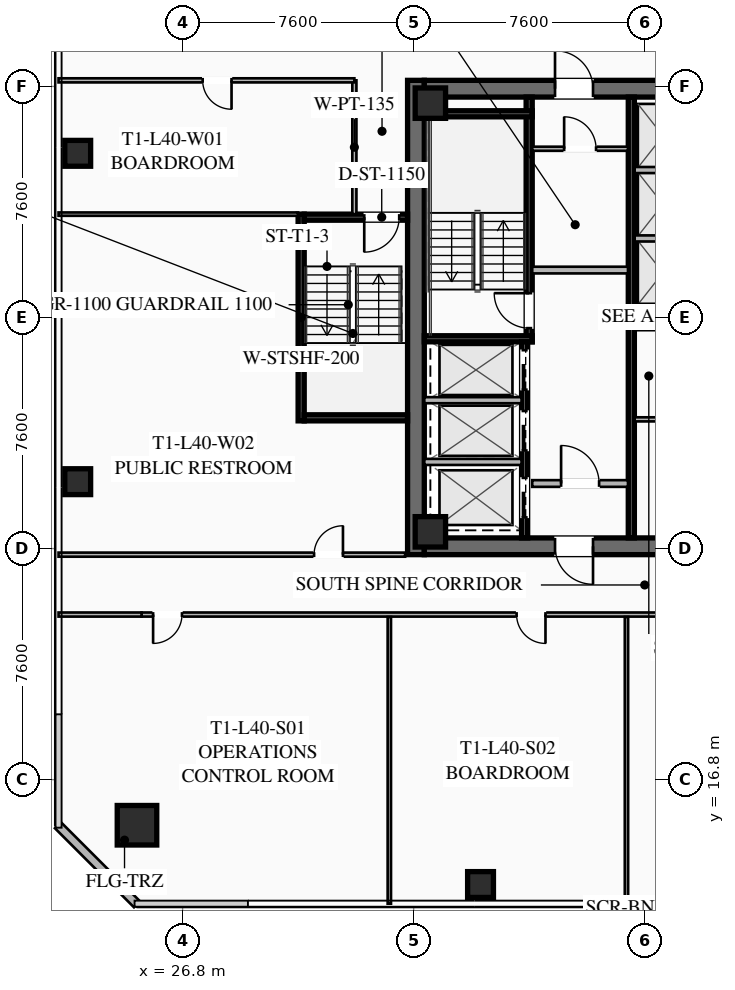
"""IFC4 building model, lengths in metres.
Left out: names, types, materials, properties, quantities, classifications, styles, units other than length and angle.
Written with IfcOpenShell. Run it as: python <this file> out.ifc"""

import sys

from ifc_helpers import new_model, si_unit, direction, frame, frame_2d, origin, origin_2d, place, context, subcontext, project, spatial, rectangle, hollow_rectangle, extrude, element, fill, save


model = new_model("IFC4")
c1 = context("Model", 3, precision=1e-05, world=origin(), true_north=direction((0.0, 1.0)))
c2 = subcontext(c1, "Body", "Model", "MODEL_VIEW")
j1 = project(units=[si_unit("LENGTHUNIT", "METRE"), si_unit("PLANEANGLEUNIT", "RADIAN")], contexts=[c1])
p1 = place(None, origin())
s1 = spatial("IfcSite", under=j1, at=p1, CompositionType="ELEMENT")
p2 = place(p1, origin())
s2 = spatial("IfcBuilding", under=s1, at=p2, CompositionType="ELEMENT")
p3 = place(p2, frame((0.0, 0.0, 149.9)))
s3 = spatial("IfcBuildingStorey", under=s2, at=p3, CompositionType="ELEMENT", Elevation=149.9)
p4 = place(p3, frame((34.475, 24.2, 0.0), z_axis=(0.0, 0.0, 1.0), x_axis=(0.0, 1.0, 0.0)))
e1 = element("IfcWall", 1, at=p4, inside=s3, PredefinedType="SHEAR", context=c2, shape_type="SweptSolid", body=[
    extrude(rectangle(XDim=15.6, YDim=0.55, at=frame_2d((7.8, 0.0))), origin(), (0.0, 0.0, 1.0), 3.55),
])
p5 = place(p3, frame((49.25, 24.475, 0.0), z_axis=(0.0, 0.0, 1.0), x_axis=(-1.0, 0.0, 0.0)))
e2 = element("IfcWall", 2, at=p5, inside=s3, PredefinedType="SHEAR", context=c2, shape_type="SweptSolid", body=[
    extrude(rectangle(XDim=14.5, YDim=0.55, at=frame_2d((7.25, 0.0))), origin(), (0.0, 0.0, 1.0), 3.55),
])
p6 = place(p5, frame((8.95, 0.0, 0.0)))
e3 = element("IfcOpeningElement", 3, at=p6, cuts=e2, PredefinedType="OPENING", context=c2, shape_type="SweptSolid", body=[
    extrude(rectangle(XDim=1.25, YDim=2.25, at=frame_2d((0.625, 1.125))), frame((0.0, 0.285, 0.0), z_axis=(0.0, -1.0, 0.0), x_axis=(1.0, 0.0, 0.0)), (0.0, 0.0, 1.0), 0.57),
])
p7 = place(p5, frame((3.9, 0.0, 0.0)))
e4 = element("IfcOpeningElement", 4, at=p7, cuts=e2, PredefinedType="OPENING", context=c2, shape_type="SweptSolid", body=[
    extrude(rectangle(XDim=1.25, YDim=2.25, at=frame_2d((0.625, 1.125))), frame((0.0, 0.285, 0.0), z_axis=(0.0, -1.0, 0.0), x_axis=(1.0, 0.0, 0.0)), (0.0, 0.0, 1.0), 0.57),
])
p8 = place(p3, frame((34.75, 39.525, 0.0), z_axis=(0.0, 0.0, 1.0), x_axis=(1.0, 0.0, 0.0)))
e5 = element("IfcWall", 5, at=p8, inside=s3, PredefinedType="SHEAR", context=c2, shape_type="SweptSolid", body=[
    extrude(rectangle(XDim=14.5, YDim=0.55, at=frame_2d((7.25, 0.0))), origin(), (0.0, 0.0, 1.0), 3.55),
])
p9 = place(p8, frame((4.3, 0.0, 0.0)))
e6 = element("IfcOpeningElement", 6, at=p9, cuts=e5, PredefinedType="OPENING", context=c2, shape_type="SweptSolid", body=[
    extrude(rectangle(XDim=1.25, YDim=2.25, at=frame_2d((0.625, 1.125))), frame((0.0, 0.285, 0.0), z_axis=(0.0, -1.0, 0.0), x_axis=(1.0, 0.0, 0.0)), (0.0, 0.0, 1.0), 0.57),
])
p10 = place(p8, frame((9.35, 0.0, 0.0)))
e7 = element("IfcOpeningElement", 7, at=p10, cuts=e5, PredefinedType="OPENING", context=c2, shape_type="SweptSolid", body=[
    extrude(rectangle(XDim=1.25, YDim=2.25, at=frame_2d((0.625, 1.125))), frame((0.0, 0.285, 0.0), z_axis=(0.0, -1.0, 0.0), x_axis=(1.0, 0.0, 0.0)), (0.0, 0.0, 1.0), 0.57),
])
for number, where, z_axis, x_axis in (
    (8, (34.95, 24.95, 0.0), (0.0, 0.0, 1.0), (1.0, 0.0, 0.0)),
    (9, (34.95, 39.05, 0.0), (0.0, 0.0, 1.0), (1.0, 0.0, 0.0)),
):
    element("IfcColumn", number, at=place(p3, frame(where, z_axis=z_axis, x_axis=x_axis)), inside=s3, PredefinedType="COLUMN", context=c2, shape_type="SweptSolid", body=[
        extrude(hollow_rectangle(XDim=1.0, YDim=1.0, WallThickness=0.04, at=origin_2d()), origin(), (0.0, 0.0, 1.0), 3.37),
    ])
p11 = place(p3, frame((25.3, 15.3, 0.0), z_axis=(0.0, 0.0, 1.0), x_axis=(1.0, 0.0, 0.0)))
e10 = element("IfcColumn", 10, at=p11, inside=s3, PredefinedType="COLUMN", context=c2, shape_type="SweptSolid", body=[
    extrude(hollow_rectangle(XDim=1.3, YDim=1.3, WallThickness=0.05, at=origin_2d()), origin(), (0.0, 0.0, 1.0), 3.37),
])
for number, where, z_axis, x_axis in (
    (11, (36.6, 13.35, 0.0), (0.0, 0.0, 1.0), (1.0, 0.0, 0.0)),
    (12, (23.35, 37.4, 0.0), (0.0, 0.0, 1.0), (1.0, 0.0, 0.0)),
    (13, (23.35, 26.6, 0.0), (0.0, 0.0, 1.0), (1.0, 0.0, 0.0)),
):
    element("IfcColumn", number, at=place(p3, frame(where, z_axis=z_axis, x_axis=x_axis)), inside=s3, PredefinedType="COLUMN", context=c2, shape_type="SweptSolid", body=[
        extrude(hollow_rectangle(XDim=0.85, YDim=0.85, WallThickness=0.035, at=origin_2d()), origin(), (0.0, 0.0, 1.0), 3.37),
    ])
p12 = place(p3, frame((25.3, 12.7, 0.0), z_axis=(0.0, 0.0, 1.0), x_axis=(-0.707106781187, 0.707106781187, 0.0)))
e14 = element("IfcWall", 14, at=p12, inside=s3, PredefinedType="SOLIDWALL", context=c2, shape_type="SweptSolid", body=[
    extrude(rectangle(XDim=3.677, YDim=0.28, at=frame_2d((1.838, 0.0))), origin(), (0.0, 0.0, 1.0), 3.37),
])
p13 = place(p3, frame((38.2, 31.2, 0.0), z_axis=(0.0, 0.0, 1.0), x_axis=(0.0, 1.0, 0.0)))
e15 = element("IfcWall", 15, at=p13, inside=s3, PredefinedType="SHEAR", context=c2, shape_type="SweptSolid", body=[
    extrude(rectangle(XDim=8.05, YDim=0.2, at=frame_2d((4.025, 0.0))), origin(), (0.0, 0.0, 1.0), 3.37),
])
p14 = place(p13, frame((0.45, 0.0, 0.0)))
e16 = element("IfcOpeningElement", 16, at=p14, cuts=e15, PredefinedType="OPENING", context=c2, shape_type="SweptSolid", body=[
    extrude(rectangle(XDim=1.15, YDim=2.2, at=frame_2d((0.575, 1.1))), frame((0.0, 0.11, 0.0), z_axis=(0.0, -1.0, 0.0), x_axis=(1.0, 0.0, 0.0)), (0.0, 0.0, 1.0), 0.22),
])
for number, where, z_axis, x_axis in (
    (17, (34.75, 31.3, 0.0), (0.0, 0.0, 1.0), (1.0, 0.0, 0.0)),
    (18, (34.75, 38.7, 0.0), (0.0, 0.0, 1.0), (1.0, 0.0, 0.0)),
):
    element("IfcWall", number, at=place(p3, frame(where, z_axis=z_axis, x_axis=x_axis)), inside=s3, PredefinedType="SHEAR", context=c2, shape_type="SweptSolid", body=[
        extrude(rectangle(XDim=3.55, YDim=0.2, at=frame_2d((1.775, 0.0))), origin(), (0.0, 0.0, 1.0), 3.37),
    ])
p15 = place(p3, frame((41.56, 24.75, 0.0), z_axis=(0.0, 0.0, 1.0), x_axis=(0.0, 1.0, 0.0)))
e19 = element("IfcWall", 19, at=p15, inside=s3, PredefinedType="SHEAR", context=c2, shape_type="SweptSolid", body=[
    extrude(rectangle(XDim=14.5, YDim=0.2, at=frame_2d((7.25, 0.0))), origin(), (0.0, 0.0, 1.0), 3.37),
])
p16 = place(p3, frame((38.3, 33.56, 0.0), z_axis=(0.0, 0.0, 1.0), x_axis=(1.0, 0.0, 0.0)))
e20 = element("IfcWall", 20, at=p16, inside=s3, PredefinedType="SOLIDWALL", context=c2, shape_type="SweptSolid", body=[
    extrude(rectangle(XDim=3.15, YDim=0.22, at=frame_2d((1.575, 0.0))), origin(), (0.0, 0.0, 1.0), 2.723),
])
p17 = place(p3, frame((38.3, 26.54, 0.0), z_axis=(0.0, 0.0, 1.0), x_axis=(1.0, 0.0, 0.0)))
e21 = element("IfcWall", 21, at=p17, inside=s3, PredefinedType="SOLIDWALL", context=c2, shape_type="SweptSolid", body=[
    extrude(rectangle(XDim=3.15, YDim=0.22, at=frame_2d((1.575, 0.0))), origin(), (0.0, 0.0, 1.0), 2.723),
])
p18 = place(p17, frame((0.95, 0.0, 0.0)))
e22 = element("IfcOpeningElement", 22, at=p18, cuts=e21, PredefinedType="OPENING", context=c2, shape_type="SweptSolid", body=[
    extrude(rectangle(XDim=1.25, YDim=2.25, at=frame_2d((0.625, 1.125))), frame((0.0, 0.12, 0.0), z_axis=(0.0, -1.0, 0.0), x_axis=(1.0, 0.0, 0.0)), (0.0, 0.0, 1.0), 0.24),
])
p19 = place(p3, frame((38.05, 24.75, 0.0), z_axis=(0.0, 0.0, 1.0), x_axis=(0.0, 1.0, 0.0)))
e23 = element("IfcWall", 23, at=p19, inside=s3, PredefinedType="SHEAR", context=c2, shape_type="SweptSolid", body=[
    extrude(rectangle(XDim=6.45, YDim=0.2, at=frame_2d((3.225, 0.0))), origin(), (0.0, 0.0, 1.0), 3.37),
])
p20 = place(p19, frame((4.875, 0.0, 0.0)))
e24 = element("IfcOpeningElement", 24, at=p20, cuts=e23, PredefinedType="OPENING", context=c2, shape_type="SweptSolid", body=[
    extrude(rectangle(XDim=1.3, YDim=2.25, at=frame_2d((0.65, 1.125))), frame((0.0, 0.11, 0.0), z_axis=(0.0, -1.0, 0.0), x_axis=(1.0, 0.0, 0.0)), (0.0, 0.0, 1.0), 0.22),
])
p21 = place(p19, frame((2.875, 0.0, 0.0)))
e25 = element("IfcOpeningElement", 25, at=p21, cuts=e23, PredefinedType="OPENING", context=c2, shape_type="SweptSolid", body=[
    extrude(rectangle(XDim=1.3, YDim=2.25, at=frame_2d((0.65, 1.125))), frame((0.0, 0.11, 0.0), z_axis=(0.0, -1.0, 0.0), x_axis=(1.0, 0.0, 0.0)), (0.0, 0.0, 1.0), 0.22),
])
p22 = place(p19, frame((0.675, 0.0, 0.0)))
e26 = element("IfcOpeningElement", 26, at=p22, cuts=e23, PredefinedType="OPENING", context=c2, shape_type="SweptSolid", body=[
    extrude(rectangle(XDim=1.3, YDim=2.25, at=frame_2d((0.65, 1.125))), frame((0.0, 0.11, 0.0), z_axis=(0.0, -1.0, 0.0), x_axis=(1.0, 0.0, 0.0)), (0.0, 0.0, 1.0), 0.22),
])
for number, where, z_axis, x_axis in (
    (27, (34.75, 27.25, 0.0), (0.0, 0.0, 1.0), (1.0, 0.0, 0.0)),
    (28, (34.75, 29.28, 0.0), (0.0, 0.0, 1.0), (1.0, 0.0, 0.0)),
):
    element("IfcWall", number, at=place(p3, frame(where, z_axis=z_axis, x_axis=x_axis)), inside=s3, PredefinedType="SOLIDWALL", context=c2, shape_type="SweptSolid", body=[
        extrude(rectangle(XDim=3.2, YDim=0.2, at=frame_2d((1.6, 0.0))), origin(), (0.0, 0.0, 1.0), 3.37),
    ])
p23 = place(p3, frame((38.3, 37.55, 0.0), z_axis=(0.0, 0.0, 1.0), x_axis=(1.0, 0.0, 0.0)))
e29 = element("IfcWall", 29, at=p23, inside=s3, PredefinedType="PARTITIONING", context=c2, shape_type="SweptSolid", body=[
    extrude(rectangle(XDim=3.15, YDim=0.135, at=frame_2d((1.575, 0.0))), origin(), (0.0, 0.0, 1.0), 2.723),
])
p24 = place(p23, frame((1.05, 0.0, 0.0)))
e30 = element("IfcOpeningElement", 30, at=p24, cuts=e29, PredefinedType="OPENING", context=c2, shape_type="SweptSolid", body=[
    extrude(rectangle(XDim=1.05, YDim=2.2, at=frame_2d((0.525, 1.1))), frame((0.0, 0.077, 0.0), z_axis=(0.0, -1.0, 0.0), x_axis=(1.0, 0.0, 0.0)), (0.0, 0.0, 1.0), 0.155),
])
for number, where, z_axis, x_axis in (
    (31, (41.67, 31.65, 0.0), (0.0, 0.0, 1.0), (1.0, 0.0, 0.0)),
    (32, (41.67, 28.65, 0.0), (0.0, 0.0, 1.0), (1.0, 0.0, 0.0)),
):
    element("IfcWall", number, at=place(p3, frame(where, z_axis=z_axis, x_axis=x_axis)), inside=s3, PredefinedType="PARTITIONING", context=c2, shape_type="SweptSolid", body=[
        extrude(rectangle(XDim=1.88, YDim=0.135, at=frame_2d((0.94, 0.0))), origin(), (0.0, 0.0, 1.0), 2.723),
    ])
for number, where, z_axis, x_axis in (
    (33, (41.67, 32.35, 0.0), (0.0, 0.0, 1.0), (1.0, 0.0, 0.0)),
    (34, (41.67, 34.6, 0.0), (0.0, 0.0, 1.0), (1.0, 0.0, 0.0)),
    (35, (41.67, 36.85, 0.0), (0.0, 0.0, 1.0), (1.0, 0.0, 0.0)),
):
    element("IfcWall", number, at=place(p3, frame(where, z_axis=z_axis, x_axis=x_axis)), inside=s3, PredefinedType="SOLIDWALL", context=c2, shape_type="SweptSolid", body=[
        extrude(rectangle(XDim=1.88, YDim=0.2, at=frame_2d((0.94, 0.0))), origin(), (0.0, 0.0, 1.0), 3.37),
    ])
p25 = place(p3, frame((30.7, 28.6, 0.0), z_axis=(0.0, 0.0, 1.0), x_axis=(0.0, 1.0, 0.0)))
e36 = element("IfcWall", 36, at=p25, inside=s3, PredefinedType="SHEAR", context=c2, shape_type="SweptSolid", body=[
    extrude(rectangle(XDim=6.8, YDim=0.2, at=frame_2d((3.4, 0.0))), origin(), (0.0, 0.0, 1.0), 3.37),
])
p26 = place(p3, frame((34.2, 35.3, 0.0), z_axis=(0.0, 0.0, 1.0), x_axis=(-1.0, 0.0, 0.0)))
e37 = element("IfcWall", 37, at=p26, inside=s3, PredefinedType="SHEAR", context=c2, shape_type="SweptSolid", body=[
    extrude(rectangle(XDim=3.4, YDim=0.2, at=frame_2d((1.7, 0.0))), origin(), (0.0, 0.0, 1.0), 3.37),
])
p27 = place(p26, frame((0.275, 0.0, 0.0)))
e38 = element("IfcOpeningElement", 38, at=p27, cuts=e37, PredefinedType="OPENING", context=c2, shape_type="SweptSolid", body=[
    extrude(rectangle(XDim=1.15, YDim=2.2, at=frame_2d((0.575, 1.1))), frame((0.0, 0.11, 0.0), z_axis=(0.0, -1.0, 0.0), x_axis=(1.0, 0.0, 0.0)), (0.0, 0.0, 1.0), 0.22),
])
p28 = place(p3, frame((30.8, 28.7, 0.0), z_axis=(0.0, 0.0, 1.0), x_axis=(1.0, 0.0, 0.0)))
e39 = element("IfcWall", 39, at=p28, inside=s3, PredefinedType="SHEAR", context=c2, shape_type="SweptSolid", body=[
    extrude(rectangle(XDim=3.4, YDim=0.2, at=frame_2d((1.7, 0.0))), origin(), (0.0, 0.0, 1.0), 3.37),
])
p29 = place(p3, frame((32.45, 35.4, 0.0), z_axis=(0.0, 0.0, 1.0), x_axis=(0.0, 1.0, 0.0)))
e40 = element("IfcWall", 40, at=p29, inside=s3, PredefinedType="PARTITIONING", context=c2, shape_type="SweptSolid", body=[
    extrude(rectangle(XDim=4.4, YDim=0.135, at=frame_2d((2.2, 0.0))), origin(), (0.0, 0.0, 1.0), 2.723),
])
p30 = place(p3, frame((58.55, 22.23, 0.0), z_axis=(0.0, 0.0, 1.0), x_axis=(-1.0, 0.0, 0.0)))
e41 = element("IfcWall", 41, at=p30, inside=s3, PredefinedType="PARTITIONING", context=c2, shape_type="SweptSolid", body=[
    extrude(rectangle(XDim=33.1, YDim=0.135, at=frame_2d((16.55, 0.0))), origin(), (0.0, 0.0, 1.0), 2.723),
])
p31 = place(p30, frame((31.77, 0.0, 0.0)))
e42 = element("IfcOpeningElement", 42, at=p31, cuts=e41, PredefinedType="OPENING", context=c2, shape_type="SweptSolid", body=[
    extrude(rectangle(XDim=0.95, YDim=2.05, at=frame_2d((0.475, 1.025))), frame((0.0, 0.077, 0.0), z_axis=(0.0, -1.0, 0.0), x_axis=(1.0, 0.0, 0.0)), (0.0, 0.0, 1.0), 0.155),
])
p32 = place(p30, frame((19.814, 0.0, 0.0)))
e43 = element("IfcOpeningElement", 43, at=p32, cuts=e41, PredefinedType="OPENING", context=c2, shape_type="SweptSolid", body=[
    extrude(rectangle(XDim=0.95, YDim=2.05, at=frame_2d((0.475, 1.025))), frame((0.0, 0.077, 0.0), z_axis=(0.0, -1.0, 0.0), x_axis=(1.0, 0.0, 0.0)), (0.0, 0.0, 1.0), 0.155),
])
p33 = place(p30, frame((0.38, 0.0, 0.0)))
e44 = element("IfcOpeningElement", 44, at=p33, cuts=e41, PredefinedType="OPENING", context=c2, shape_type="SweptSolid", body=[
    extrude(rectangle(XDim=0.95, YDim=2.05, at=frame_2d((0.475, 1.025))), frame((0.0, 0.077, 0.0), z_axis=(0.0, -1.0, 0.0), x_axis=(1.0, 0.0, 0.0)), (0.0, 0.0, 1.0), 0.155),
])
p34 = place(p3, frame((22.72, 22.23, 0.0), z_axis=(0.0, 0.0, 1.0), x_axis=(1.0, 0.0, 0.0)))
e45 = element("IfcWall", 45, at=p34, inside=s3, PredefinedType="PARTITIONING", context=c2, shape_type="SweptSolid", body=[
    extrude(rectangle(XDim=2.73, YDim=0.135, at=frame_2d((1.365, 0.0))), origin(), (0.0, 0.0, 1.0), 2.723),
])
for number, where, z_axis, x_axis in (
    (46, (33.6, 12.72, 0.0), (0.0, 0.0, 1.0), (0.0, 1.0, 0.0)),
    (47, (41.4, 12.72, 0.0), (0.0, 0.0, 1.0), (0.0, 1.0, 0.0)),
):
    element("IfcWall", number, at=place(p3, frame(where, z_axis=z_axis, x_axis=x_axis)), inside=s3, PredefinedType="PARTITIONING", context=c2, shape_type="SweptSolid", body=[
        extrude(rectangle(XDim=9.43, YDim=0.11, at=frame_2d((4.715, 0.0))), origin(), (0.0, 0.0, 1.0), 2.723),
    ])
p35 = place(p3, frame((32.45, 39.8, 0.0), z_axis=(0.0, 0.0, 1.0), x_axis=(-1.0, 0.0, 0.0)))
e48 = element("IfcWall", 48, at=p35, inside=s3, PredefinedType="PARTITIONING", context=c2, shape_type="SweptSolid", body=[
    extrude(rectangle(XDim=9.73, YDim=0.135, at=frame_2d((4.865, 0.0))), origin(), (0.0, 0.0, 1.0), 2.723),
])
p36 = place(p35, frame((4.04, 0.0, 0.0)))
e49 = element("IfcOpeningElement", 49, at=p36, cuts=e48, PredefinedType="OPENING", context=c2, shape_type="SweptSolid", body=[
    extrude(rectangle(XDim=0.95, YDim=2.05, at=frame_2d((0.475, 1.025))), frame((0.0, 0.077, 0.0), z_axis=(0.0, -1.0, 0.0), x_axis=(1.0, 0.0, 0.0)), (0.0, 0.0, 1.0), 0.155),
])
p37 = place(p3, frame((22.72, 24.2, 0.0), z_axis=(0.0, 0.0, 1.0), x_axis=(1.0, 0.0, 0.0)))
e50 = element("IfcWall", 50, at=p37, inside=s3, PredefinedType="PARTITIONING", context=c2, shape_type="SweptSolid", body=[
    extrude(rectangle(XDim=11.4, YDim=0.135, at=frame_2d((5.7, 0.0))), origin(), (0.0, 0.0, 1.0), 2.723),
])
p38 = place(p37, frame((8.405, 0.0, 0.0)))
e51 = element("IfcOpeningElement", 51, at=p38, cuts=e50, PredefinedType="OPENING", context=c2, shape_type="SweptSolid", body=[
    extrude(rectangle(XDim=0.95, YDim=2.05, at=frame_2d((0.475, 1.025))), frame((0.0, 0.077, 0.0), z_axis=(0.0, -1.0, 0.0), x_axis=(1.0, 0.0, 0.0)), (0.0, 0.0, 1.0), 0.155),
])
p39 = place(p3, frame((30.6, 35.4, 0.0), z_axis=(0.0, 0.0, 1.0), x_axis=(-1.0, 0.0, 0.0)))
e52 = element("IfcWall", 52, at=p39, inside=s3, PredefinedType="PARTITIONING", context=c2, shape_type="SweptSolid", body=[
    extrude(rectangle(XDim=7.88, YDim=0.11, at=frame_2d((3.94, 0.0))), origin(), (0.0, 0.0, 1.0), 2.723),
])
p40 = place(p9, origin())
e53 = element("IfcDoor", 53, at=p40, inside=s3, OperationType="SINGLE_SWING_LEFT", PredefinedType="DOOR", context=c2, shape_type="SweptSolid", body=[
    extrude(rectangle(XDim=1.25, YDim=2.25, at=frame_2d((0.625, 1.125))), frame((0.0, 0.025, 0.0), z_axis=(0.0, -1.0, 0.0), x_axis=(1.0, 0.0, 0.0)), (0.0, 0.0, 1.0), 0.05),
])
fill(e6, e53)
p41 = place(p6, origin())
e54 = element("IfcDoor", 54, at=p41, inside=s3, OperationType="SINGLE_SWING_LEFT", PredefinedType="DOOR", context=c2, shape_type="SweptSolid", body=[
    extrude(rectangle(XDim=1.25, YDim=2.25, at=frame_2d((0.625, 1.125))), frame((0.0, 0.025, 0.0), z_axis=(0.0, -1.0, 0.0), x_axis=(1.0, 0.0, 0.0)), (0.0, 0.0, 1.0), 0.05),
])
fill(e3, e54)
p42 = place(p14, origin())
e55 = element("IfcDoor", 55, at=p42, inside=s3, OperationType="SINGLE_SWING_RIGHT", PredefinedType="DOOR", context=c2, shape_type="SweptSolid", body=[
    extrude(rectangle(XDim=1.15, YDim=2.2, at=frame_2d((0.575, 1.1))), frame((0.0, 0.025, 0.0), z_axis=(0.0, -1.0, 0.0), x_axis=(1.0, 0.0, 0.0)), (0.0, 0.0, 1.0), 0.05),
])
fill(e16, e55)
p43 = place(p18, origin())
e56 = element("IfcDoor", 56, at=p43, inside=s3, OperationType="SINGLE_SWING_LEFT", PredefinedType="DOOR", context=c2, shape_type="SweptSolid", body=[
    extrude(rectangle(XDim=1.25, YDim=2.25, at=frame_2d((0.625, 1.125))), frame((0.0, 0.025, 0.0), z_axis=(0.0, -1.0, 0.0), x_axis=(1.0, 0.0, 0.0)), (0.0, 0.0, 1.0), 0.05),
])
fill(e22, e56)
p44 = place(p24, origin())
e57 = element("IfcDoor", 57, at=p44, inside=s3, OperationType="SINGLE_SWING_LEFT", PredefinedType="DOOR", context=c2, shape_type="SweptSolid", body=[
    extrude(rectangle(XDim=1.05, YDim=2.2, at=frame_2d((0.525, 1.1))), frame((0.0, 0.025, 0.0), z_axis=(0.0, -1.0, 0.0), x_axis=(1.0, 0.0, 0.0)), (0.0, 0.0, 1.0), 0.05),
])
fill(e30, e57)
p45 = place(p27, origin())
e58 = element("IfcDoor", 58, at=p45, inside=s3, OperationType="SINGLE_SWING_RIGHT", PredefinedType="DOOR", context=c2, shape_type="SweptSolid", body=[
    extrude(rectangle(XDim=1.15, YDim=2.2, at=frame_2d((0.575, 1.1))), frame((0.0, 0.025, 0.0), z_axis=(0.0, -1.0, 0.0), x_axis=(1.0, 0.0, 0.0)), (0.0, 0.0, 1.0), 0.05),
])
fill(e38, e58)
p46 = place(p31, origin())
e59 = element("IfcDoor", 59, at=p46, inside=s3, OperationType="SINGLE_SWING_RIGHT", PredefinedType="DOOR", context=c2, shape_type="SweptSolid", body=[
    extrude(rectangle(XDim=0.95, YDim=2.05, at=frame_2d((0.475, 1.025))), frame((0.0, 0.025, 0.0), z_axis=(0.0, -1.0, 0.0), x_axis=(1.0, 0.0, 0.0)), (0.0, 0.0, 1.0), 0.05),
])
fill(e42, e59)
p47 = place(p32, origin())
e60 = element("IfcDoor", 60, at=p47, inside=s3, OperationType="SINGLE_SWING_LEFT", PredefinedType="DOOR", context=c2, shape_type="SweptSolid", body=[
    extrude(rectangle(XDim=0.95, YDim=2.05, at=frame_2d((0.475, 1.025))), frame((0.0, 0.025, 0.0), z_axis=(0.0, -1.0, 0.0), x_axis=(1.0, 0.0, 0.0)), (0.0, 0.0, 1.0), 0.05),
])
fill(e43, e60)
p48 = place(p36, origin())
e61 = element("IfcDoor", 61, at=p48, inside=s3, OperationType="SINGLE_SWING_LEFT", PredefinedType="DOOR", context=c2, shape_type="SweptSolid", body=[
    extrude(rectangle(XDim=0.95, YDim=2.05, at=frame_2d((0.475, 1.025))), frame((0.0, 0.025, 0.0), z_axis=(0.0, -1.0, 0.0), x_axis=(1.0, 0.0, 0.0)), (0.0, 0.0, 1.0), 0.05),
])
fill(e49, e61)
p49 = place(p38, origin())
e62 = element("IfcDoor", 62, at=p49, inside=s3, OperationType="SINGLE_SWING_RIGHT", PredefinedType="DOOR", context=c2, shape_type="SweptSolid", body=[
    extrude(rectangle(XDim=0.95, YDim=2.05, at=frame_2d((0.475, 1.025))), frame((0.0, 0.025, 0.0), z_axis=(0.0, -1.0, 0.0), x_axis=(1.0, 0.0, 0.0)), (0.0, 0.0, 1.0), 0.05),
])
fill(e51, e62)
p50 = place(p20, origin())
e63 = element("IfcDoor", 63, at=p50, inside=s3, OperationType="SLIDING_TO_LEFT", PredefinedType="DOOR", context=c2, shape_type="SweptSolid", body=[
    extrude(rectangle(XDim=1.3, YDim=2.25, at=frame_2d((0.65, 1.125))), frame((0.0, 0.025, 0.0), z_axis=(0.0, -1.0, 0.0), x_axis=(1.0, 0.0, 0.0)), (0.0, 0.0, 1.0), 0.05),
])
fill(e24, e63)
p51 = place(p21, origin())
e64 = element("IfcDoor", 64, at=p51, inside=s3, OperationType="SLIDING_TO_LEFT", PredefinedType="DOOR", context=c2, shape_type="SweptSolid", body=[
    extrude(rectangle(XDim=1.3, YDim=2.25, at=frame_2d((0.65, 1.125))), frame((0.0, 0.025, 0.0), z_axis=(0.0, -1.0, 0.0), x_axis=(1.0, 0.0, 0.0)), (0.0, 0.0, 1.0), 0.05),
])
fill(e25, e64)
p52 = place(p22, origin())
e65 = element("IfcDoor", 65, at=p52, inside=s3, OperationType="SLIDING_TO_LEFT", PredefinedType="DOOR", context=c2, shape_type="SweptSolid", body=[
    extrude(rectangle(XDim=1.3, YDim=2.25, at=frame_2d((0.65, 1.125))), frame((0.0, 0.025, 0.0), z_axis=(0.0, -1.0, 0.0), x_axis=(1.0, 0.0, 0.0)), (0.0, 0.0, 1.0), 0.05),
])
fill(e26, e65)
save(model, sys.argv[1])
